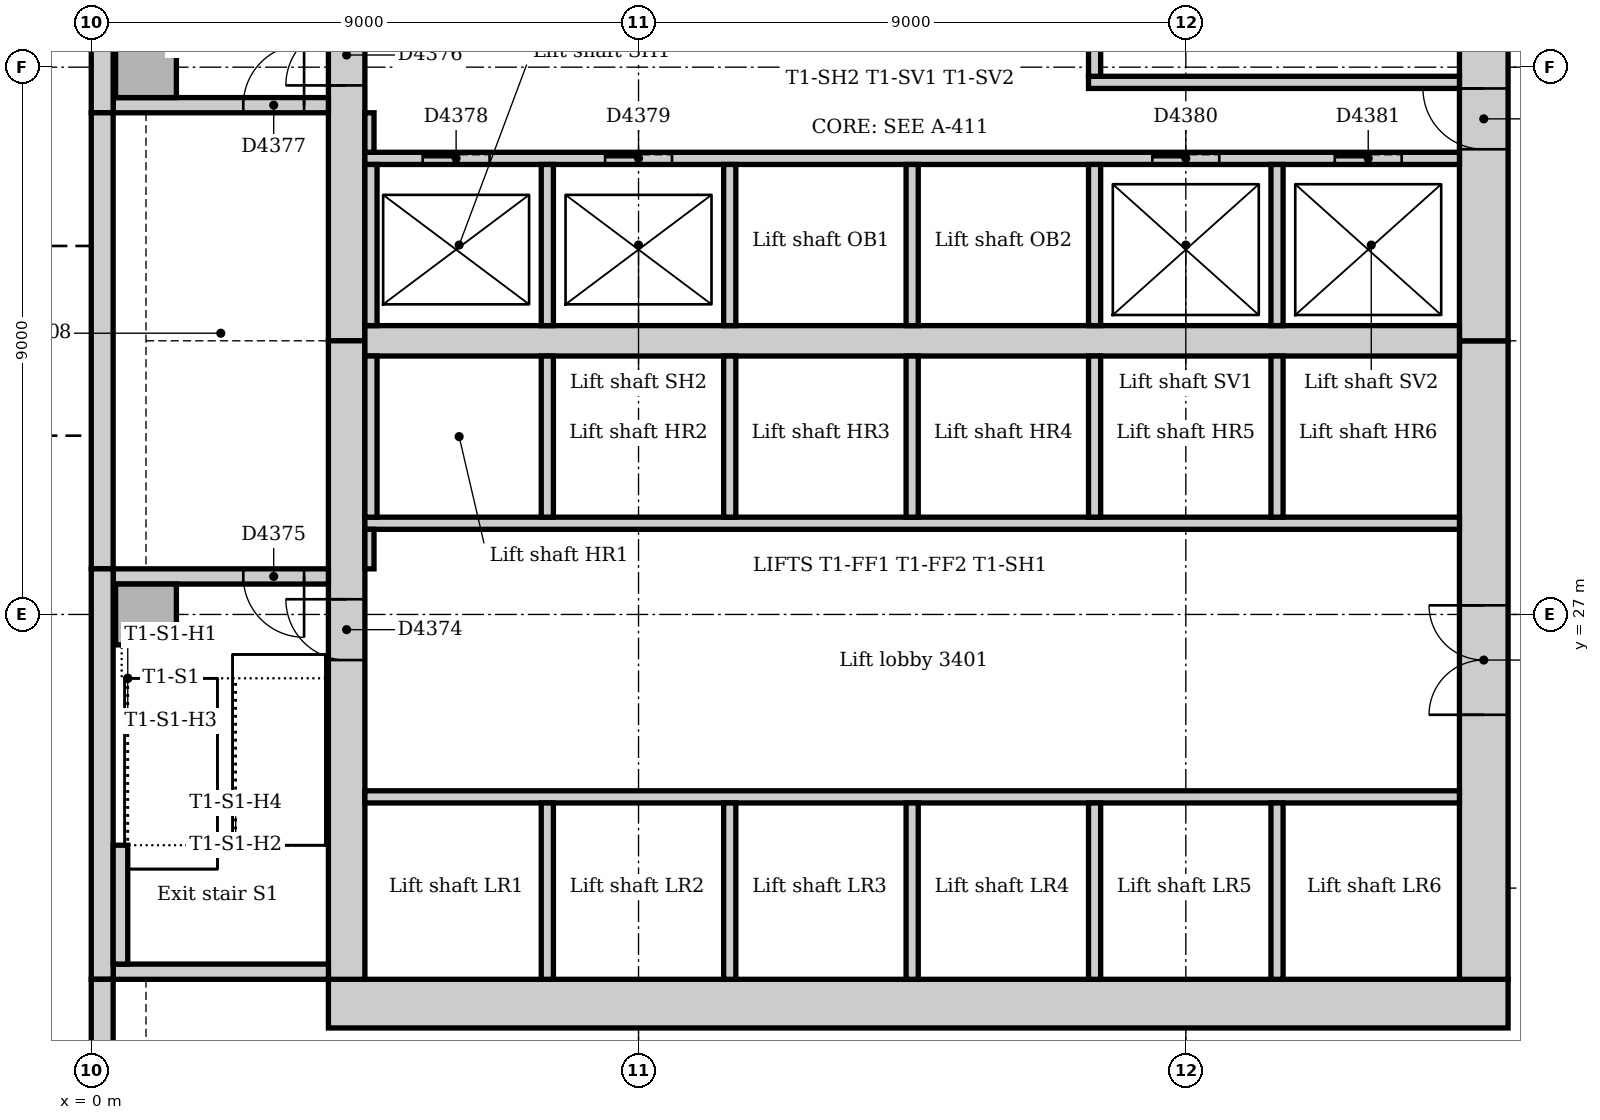
"""IFC4 building model, lengths in metres.
Left out: names, types, materials, properties, quantities, classifications, styles, units other than length and angle.
Written with IfcOpenShell. Run it as: python <this file> out.ifc"""

import sys

from ifc_helpers import new_model, si_unit, direction, frame, frame_2d, origin, origin_2d, place, context, subcontext, project, spatial, rectangle, extrude, element, fill, save


model = new_model("IFC4")
c1 = context("Model", 3, precision=1e-05, world=origin(), true_north=direction((0.0, 1.0)))
c2 = subcontext(c1, "Body", "Model", "MODEL_VIEW")
j1 = project(units=[si_unit("LENGTHUNIT", "METRE"), si_unit("PLANEANGLEUNIT", "RADIAN")], contexts=[c1])
p1 = place(None, origin())
s1 = spatial("IfcSite", under=j1, at=p1, CompositionType="ELEMENT")
p2 = place(p1, origin())
s2 = spatial("IfcBuilding", under=s1, at=p2, CompositionType="ELEMENT")
p3 = place(p2, frame((0.0, 0.0, 144.0)))
s3 = spatial("IfcBuildingStorey", under=s2, at=p3, CompositionType="ELEMENT", Elevation=144.0)
p4 = place(p3, frame((3.9, 20.6, 0.0), z_axis=(0.0, 0.0, 1.0), x_axis=(1.0, 0.0, 0.0)))
e1 = element("IfcWall", 1, at=p4, inside=s3, PredefinedType="SOLIDWALL", context=c2, shape_type="SweptSolid", body=[
    extrude(rectangle(XDim=19.4, YDim=0.8, at=frame_2d((9.7, 0.0))), origin(), (0.0, 0.0, 1.0), 5.0),
])
p5 = place(p3, frame((22.9, 21.0, 0.0), z_axis=(0.0, 0.0, 1.0), x_axis=(0.0, 1.0, 0.0)))
e2 = element("IfcWall", 2, at=p5, inside=s3, PredefinedType="SOLIDWALL", context=c2, shape_type="SweptSolid", body=[
    extrude(rectangle(XDim=10.5, YDim=0.8, at=frame_2d((5.25, 0.0))), origin(), (0.0, 0.0, 1.0), 5.0),
])
p6 = place(p5, frame((4.35, 0.0, 0.0)))
e3 = element("IfcOpeningElement", 3, at=p6, cuts=e2, PredefinedType="OPENING", context=c2, shape_type="SweptSolid", body=[
    extrude(rectangle(XDim=1.8, YDim=2.1, at=frame_2d((0.9, 1.05))), frame((0.0, 0.41, 0.0), z_axis=(0.0, -1.0, 0.0), x_axis=(1.0, 0.0, 0.0)), (0.0, 0.0, 1.0), 0.82),
])
p7 = place(p3, frame((22.9, 31.5, 0.0), z_axis=(0.0, 0.0, 1.0), x_axis=(0.0, 1.0, 0.0)))
e4 = element("IfcWall", 4, at=p7, inside=s3, PredefinedType="SOLIDWALL", context=c2, shape_type="SweptSolid", body=[
    extrude(rectangle(XDim=10.5, YDim=0.8, at=frame_2d((5.25, 0.0))), origin(), (0.0, 0.0, 1.0), 5.0),
])
p8 = place(p7, frame((3.15, 0.0, 0.0)))
e5 = element("IfcOpeningElement", 5, at=p8, cuts=e4, PredefinedType="OPENING", context=c2, shape_type="SweptSolid", body=[
    extrude(rectangle(XDim=1.0, YDim=2.1, at=frame_2d((0.5, 1.05))), frame((0.0, 0.41, 0.0), z_axis=(0.0, -1.0, 0.0), x_axis=(1.0, 0.0, 0.0)), (0.0, 0.0, 1.0), 0.82),
])
p9 = place(p7, frame((5.2, 0.0, 0.0)))
e6 = element("IfcOpeningElement", 6, at=p9, cuts=e4, PredefinedType="OPENING", context=c2, shape_type="SweptSolid", body=[
    extrude(rectangle(XDim=1.0, YDim=2.1, at=frame_2d((0.5, 1.05))), frame((0.0, 0.41, 0.0), z_axis=(0.0, -1.0, 0.0), x_axis=(1.0, 0.0, 0.0)), (0.0, 0.0, 1.0), 0.82),
])
p10 = place(p3, frame((4.2, 42.0, 0.0), z_axis=(0.0, 0.0, 1.0), x_axis=(0.0, -1.0, 0.0)))
e7 = element("IfcWall", 7, at=p10, inside=s3, PredefinedType="SOLIDWALL", context=c2, shape_type="SweptSolid", body=[
    extrude(rectangle(XDim=10.5, YDim=0.6, at=frame_2d((5.25, 0.0))), origin(), (0.0, 0.0, 1.0), 5.0),
])
p11 = place(p10, frame((5.3, 0.0, 0.0)))
e8 = element("IfcOpeningElement", 8, at=p11, cuts=e7, PredefinedType="OPENING", context=c2, shape_type="SweptSolid", body=[
    extrude(rectangle(XDim=1.0, YDim=2.1, at=frame_2d((0.5, 1.05))), frame((0.0, 0.31, 0.0), z_axis=(0.0, -1.0, 0.0), x_axis=(1.0, 0.0, 0.0)), (0.0, 0.0, 1.0), 0.62),
])
p12 = place(p3, frame((4.2, 31.5, 0.0), z_axis=(0.0, 0.0, 1.0), x_axis=(0.0, -1.0, 0.0)))
e9 = element("IfcWall", 9, at=p12, inside=s3, PredefinedType="SOLIDWALL", context=c2, shape_type="SweptSolid", body=[
    extrude(rectangle(XDim=10.5, YDim=0.6, at=frame_2d((5.25, 0.0))), origin(), (0.0, 0.0, 1.0), 5.0),
])
p13 = place(p12, frame((4.25, 0.0, 0.0)))
e10 = element("IfcOpeningElement", 10, at=p13, cuts=e9, PredefinedType="OPENING", context=c2, shape_type="SweptSolid", body=[
    extrude(rectangle(XDim=1.0, YDim=2.1, at=frame_2d((0.5, 1.05))), frame((0.0, 0.31, 0.0), z_axis=(0.0, -1.0, 0.0), x_axis=(1.0, 0.0, 0.0)), (0.0, 0.0, 1.0), 0.62),
])
p14 = place(p3, frame((4.5, 31.5, 0.0), z_axis=(0.0, 0.0, 1.0), x_axis=(1.0, 0.0, 0.0)))
e11 = element("IfcWall", 11, at=p14, inside=s3, PredefinedType="SOLIDWALL", context=c2, shape_type="SweptSolid", body=[
    extrude(rectangle(XDim=18.0, YDim=0.5, at=frame_2d((9.0, 0.0))), origin(), (0.0, 0.0, 1.0), 5.0),
])
p15 = place(p3, frame((0.36, 21.125, 0.0), z_axis=(0.0, 0.0, 1.0), x_axis=(1.0, 0.0, 0.0)))
e12 = element("IfcWall", 12, at=p15, inside=s3, PredefinedType="SOLIDWALL", context=c2, shape_type="SweptSolid", body=[
    extrude(rectangle(XDim=3.54, YDim=0.25, at=frame_2d((1.77, 0.0))), origin(), (0.0, 0.0, 1.0), 5.0),
])
p16 = place(p3, frame((3.9, 27.625, 0.0), z_axis=(0.0, 0.0, 1.0), x_axis=(-1.0, 0.0, 0.0)))
e13 = element("IfcWall", 13, at=p16, inside=s3, PredefinedType="SOLIDWALL", context=c2, shape_type="SweptSolid", body=[
    extrude(rectangle(XDim=3.54, YDim=0.25, at=frame_2d((1.77, 0.0))), origin(), (0.0, 0.0, 1.0), 5.0),
])
p17 = place(p16, frame((0.4, 0.0, 0.0)))
e14 = element("IfcOpeningElement", 14, at=p17, cuts=e13, PredefinedType="OPENING", context=c2, shape_type="SweptSolid", body=[
    extrude(rectangle(XDim=1.0, YDim=2.1, at=frame_2d((0.5, 1.05))), frame((0.0, 0.135, 0.0), z_axis=(0.0, -1.0, 0.0), x_axis=(1.0, 0.0, 0.0)), (0.0, 0.0, 1.0), 0.27),
])
p18 = place(p3, frame((0.36, 35.375, 0.0), z_axis=(0.0, 0.0, 1.0), x_axis=(1.0, 0.0, 0.0)))
e15 = element("IfcWall", 15, at=p18, inside=s3, PredefinedType="SOLIDWALL", context=c2, shape_type="SweptSolid", body=[
    extrude(rectangle(XDim=3.54, YDim=0.25, at=frame_2d((1.77, 0.0))), origin(), (0.0, 0.0, 1.0), 5.0),
])
p19 = place(p18, frame((2.14, 0.0, 0.0)))
e16 = element("IfcOpeningElement", 16, at=p19, cuts=e15, PredefinedType="OPENING", context=c2, shape_type="SweptSolid", body=[
    extrude(rectangle(XDim=1.0, YDim=2.1, at=frame_2d((0.5, 1.05))), frame((0.0, 0.135, 0.0), z_axis=(0.0, -1.0, 0.0), x_axis=(1.0, 0.0, 0.0)), (0.0, 0.0, 1.0), 0.27),
])
for number, where, z_axis, x_axis in (
    (17, (0.9, 27.0, 0.0), (0.0, 0.0, 1.0), (1.0, 0.0, 0.0)),
    (18, (0.9, 36.0, 0.0), (0.0, 0.0, 1.0), (1.0, 0.0, 0.0)),
):
    element("IfcColumn", number, at=place(p3, frame(where, z_axis=z_axis, x_axis=x_axis)), inside=s3, PredefinedType="COLUMN", context=c2, shape_type="SweptSolid", body=[
        extrude(rectangle(XDim=1.0, YDim=1.0, at=origin_2d()), origin(), (0.0, 0.0, 1.0), 5.0),
    ])
p20 = place(p3, frame((0.18, 42.0, 0.0), z_axis=(0.0, 0.0, 1.0), x_axis=(0.0, -1.0, 0.0)))
e19 = element("IfcWall", 19, at=p20, inside=s3, PredefinedType="STANDARD", context=c2, shape_type="SweptSolid", body=[
    extrude(rectangle(XDim=6.75, YDim=0.36, at=frame_2d((3.375, 0.0))), origin(), (0.0, 0.0, 1.0), 4.85),
])
p21 = place(p3, frame((0.18, 35.25, 0.0), z_axis=(0.0, 0.0, 1.0), x_axis=(0.0, -1.0, 0.0)))
e20 = element("IfcWall", 20, at=p21, inside=s3, PredefinedType="STANDARD", context=c2, shape_type="SweptSolid", body=[
    extrude(rectangle(XDim=7.5, YDim=0.36, at=frame_2d((3.75, 0.0))), origin(), (0.0, 0.0, 1.0), 4.85),
])
p22 = place(p3, frame((0.18, 27.75, 0.0), z_axis=(0.0, 0.0, 1.0), x_axis=(0.0, -1.0, 0.0)))
e21 = element("IfcWall", 21, at=p22, inside=s3, PredefinedType="STANDARD", context=c2, shape_type="SweptSolid", body=[
    extrude(rectangle(XDim=6.75, YDim=0.36, at=frame_2d((3.375, 0.0))), origin(), (0.0, 0.0, 1.0), 4.85),
])
p23 = place(p3, frame((0.18, 21.0, 0.0), z_axis=(0.0, 0.0, 1.0), x_axis=(0.0, -1.0, 0.0)))
e22 = element("IfcWall", 22, at=p23, inside=s3, PredefinedType="STANDARD", context=c2, shape_type="SweptSolid", body=[
    extrude(rectangle(XDim=12.257, YDim=0.36, at=frame_2d((6.129, 0.0))), origin(), (0.0, 0.0, 1.0), 4.85),
])
p24 = place(p23, frame((1.35, 0.0, 0.9)))
e23 = element("IfcOpeningElement", 23, at=p24, cuts=e22, PredefinedType="OPENING", context=c2, shape_type="SweptSolid", body=[
    extrude(rectangle(XDim=3.3, YDim=2.2, at=frame_2d((1.65, 1.1))), frame((0.0, 0.19, 0.0), z_axis=(0.0, -1.0, 0.0), x_axis=(1.0, 0.0, 0.0)), (0.0, 0.0, 1.0), 0.38),
])
p25 = place(p23, frame((5.85, 0.0, 0.9)))
e24 = element("IfcOpeningElement", 24, at=p25, cuts=e22, PredefinedType="OPENING", context=c2, shape_type="SweptSolid", body=[
    extrude(rectangle(XDim=3.3, YDim=2.2, at=frame_2d((1.65, 1.1))), frame((0.0, 0.19, 0.0), z_axis=(0.0, -1.0, 0.0), x_axis=(1.0, 0.0, 0.0)), (0.0, 0.0, 1.0), 0.38),
])
p26 = place(p3, frame((0.48, 21.25, 0.0), z_axis=(0.0, 0.0, 1.0), x_axis=(0.0, 1.0, 0.0)))
e25 = element("IfcWall", 25, at=p26, inside=s3, PredefinedType="STANDARD", context=c2, shape_type="SweptSolid", body=[
    extrude(rectangle(XDim=1.955, YDim=0.24, at=frame_2d((0.978, 0.0))), origin(), (0.0, 0.0, 1.0), 5.0),
])
p27 = place(p3, frame((16.4, 35.75, 0.0), z_axis=(0.0, 0.0, 1.0), x_axis=(1.0, 0.0, 0.0)))
e26 = element("IfcWall", 26, at=p27, inside=s3, PredefinedType="PARTITIONING", context=c2, shape_type="SweptSolid", body=[
    extrude(rectangle(XDim=6.1, YDim=0.2, at=frame_2d((3.05, 0.0))), origin(), (0.0, 0.0, 1.0), 4.85),
])
p28 = place(p3, frame((16.5, 35.85, 0.0), z_axis=(0.0, 0.0, 1.0), x_axis=(0.0, 1.0, 0.0)))
e27 = element("IfcWall", 27, at=p28, inside=s3, PredefinedType="PARTITIONING", context=c2, shape_type="SweptSolid", body=[
    extrude(rectangle(XDim=2.55, YDim=0.2, at=frame_2d((1.275, 0.0))), origin(), (0.0, 0.0, 1.0), 4.85),
])
for number, where, z_axis, x_axis in (
    (28, (4.5, 24.0, 0.0), (0.0, 0.0, 1.0), (1.0, 0.0, 0.0)),
    (29, (4.5, 28.5, 0.0), (0.0, 0.0, 1.0), (1.0, 0.0, 0.0)),
):
    element("IfcWall", number, at=place(p3, frame(where, z_axis=z_axis, x_axis=x_axis)), inside=s3, PredefinedType="PARTITIONING", context=c2, shape_type="SweptSolid", body=[
        extrude(rectangle(XDim=18.0, YDim=0.2, at=frame_2d((9.0, 0.0))), origin(), (0.0, 0.0, 1.0), 4.85),
    ])
p29 = place(p3, frame((4.5, 34.5, 0.0), z_axis=(0.0, 0.0, 1.0), x_axis=(1.0, 0.0, 0.0)))
e30 = element("IfcWall", 30, at=p29, inside=s3, PredefinedType="PARTITIONING", context=c2, shape_type="SweptSolid", body=[
    extrude(rectangle(XDim=18.0, YDim=0.2, at=frame_2d((9.0, 0.0))), origin(), (0.0, 0.0, 1.0), 4.85),
])
p30 = place(p29, frame((0.95, 0.0, 0.0)))
e31 = element("IfcOpeningElement", 31, at=p30, cuts=e30, PredefinedType="OPENING", context=c2, shape_type="SweptSolid", body=[
    extrude(rectangle(XDim=1.1, YDim=2.1, at=frame_2d((0.55, 1.05))), frame((0.0, 0.11, 0.0), z_axis=(0.0, -1.0, 0.0), x_axis=(1.0, 0.0, 0.0)), (0.0, 0.0, 1.0), 0.22),
])
p31 = place(p29, frame((3.95, 0.0, 0.0)))
e32 = element("IfcOpeningElement", 32, at=p31, cuts=e30, PredefinedType="OPENING", context=c2, shape_type="SweptSolid", body=[
    extrude(rectangle(XDim=1.1, YDim=2.1, at=frame_2d((0.55, 1.05))), frame((0.0, 0.11, 0.0), z_axis=(0.0, -1.0, 0.0), x_axis=(1.0, 0.0, 0.0)), (0.0, 0.0, 1.0), 0.22),
])
p32 = place(p29, frame((12.95, 0.0, 0.0)))
e33 = element("IfcOpeningElement", 33, at=p32, cuts=e30, PredefinedType="OPENING", context=c2, shape_type="SweptSolid", body=[
    extrude(rectangle(XDim=1.1, YDim=2.1, at=frame_2d((0.55, 1.05))), frame((0.0, 0.11, 0.0), z_axis=(0.0, -1.0, 0.0), x_axis=(1.0, 0.0, 0.0)), (0.0, 0.0, 1.0), 0.22),
])
p33 = place(p29, frame((15.95, 0.0, 0.0)))
e34 = element("IfcOpeningElement", 34, at=p33, cuts=e30, PredefinedType="OPENING", context=c2, shape_type="SweptSolid", body=[
    extrude(rectangle(XDim=1.1, YDim=2.1, at=frame_2d((0.55, 1.05))), frame((0.0, 0.11, 0.0), z_axis=(0.0, -1.0, 0.0), x_axis=(1.0, 0.0, 0.0)), (0.0, 0.0, 1.0), 0.22),
])
for number, where, z_axis, x_axis in (
    (35, (4.6, 31.75, 0.0), (0.0, 0.0, 1.0), (0.0, 1.0, 0.0)),
    (36, (4.6, 28.6, 0.0), (0.0, 0.0, 1.0), (0.0, 1.0, 0.0)),
    (37, (7.5, 28.6, 0.0), (0.0, 0.0, 1.0), (0.0, 1.0, 0.0)),
    (38, (7.5, 31.75, 0.0), (0.0, 0.0, 1.0), (0.0, 1.0, 0.0)),
    (39, (10.5, 28.6, 0.0), (0.0, 0.0, 1.0), (0.0, 1.0, 0.0)),
    (40, (10.5, 31.75, 0.0), (0.0, 0.0, 1.0), (0.0, 1.0, 0.0)),
    (41, (13.5, 28.6, 0.0), (0.0, 0.0, 1.0), (0.0, 1.0, 0.0)),
    (42, (13.5, 31.75, 0.0), (0.0, 0.0, 1.0), (0.0, 1.0, 0.0)),
    (43, (16.5, 28.6, 0.0), (0.0, 0.0, 1.0), (0.0, 1.0, 0.0)),
    (44, (16.5, 31.75, 0.0), (0.0, 0.0, 1.0), (0.0, 1.0, 0.0)),
    (45, (19.5, 28.6, 0.0), (0.0, 0.0, 1.0), (0.0, 1.0, 0.0)),
    (46, (19.5, 31.75, 0.0), (0.0, 0.0, 1.0), (0.0, 1.0, 0.0)),
):
    element("IfcWall", number, at=place(p3, frame(where, z_axis=z_axis, x_axis=x_axis)), inside=s3, PredefinedType="PARTITIONING", context=c2, shape_type="SweptSolid", body=[
        extrude(rectangle(XDim=2.65, YDim=0.2, at=frame_2d((1.325, 0.0))), origin(), (0.0, 0.0, 1.0), 4.85),
    ])
for number, where, z_axis, x_axis in (
    (47, (7.5, 21.0, 0.0), (0.0, 0.0, 1.0), (0.0, 1.0, 0.0)),
    (48, (10.5, 21.0, 0.0), (0.0, 0.0, 1.0), (0.0, 1.0, 0.0)),
    (49, (13.5, 21.0, 0.0), (0.0, 0.0, 1.0), (0.0, 1.0, 0.0)),
    (50, (16.5, 21.0, 0.0), (0.0, 0.0, 1.0), (0.0, 1.0, 0.0)),
    (51, (19.5, 21.0, 0.0), (0.0, 0.0, 1.0), (0.0, 1.0, 0.0)),
):
    element("IfcWall", number, at=place(p3, frame(where, z_axis=z_axis, x_axis=x_axis)), inside=s3, PredefinedType="PARTITIONING", context=c2, shape_type="SweptSolid", body=[
        extrude(rectangle(XDim=2.9, YDim=0.2, at=frame_2d((1.45, 0.0))), origin(), (0.0, 0.0, 1.0), 4.85),
    ])
for number, where, z_axis, x_axis in (
    (52, (4.575, 27.75, 0.0), (0.0, 0.0, 1.0), (0.0, 1.0, 0.0)),
    (53, (4.575, 34.6, 0.0), (0.0, 0.0, 1.0), (0.0, 1.0, 0.0)),
):
    element("IfcWall", number, at=place(p3, frame(where, z_axis=z_axis, x_axis=x_axis)), inside=s3, PredefinedType="PARTITIONING", context=c2, shape_type="SweptSolid", body=[
        extrude(rectangle(XDim=0.65, YDim=0.15, at=frame_2d((0.325, 0.0))), origin(), (0.0, 0.0, 1.0), 4.85),
    ])
p34 = place(p13, frame((1.0, 0.0, 0.0), z_axis=(0.0, 0.0, 1.0), x_axis=(-1.0, 0.0, 0.0)))
e54 = element("IfcDoor", 54, at=p34, inside=s3, OperationType="SINGLE_SWING_RIGHT", PredefinedType="DOOR", context=c2, shape_type="SweptSolid", body=[
    extrude(rectangle(XDim=1.0, YDim=2.1, at=frame_2d((0.5, 1.05))), frame((0.0, 0.025, 0.0), z_axis=(0.0, -1.0, 0.0), x_axis=(1.0, 0.0, 0.0)), (0.0, 0.0, 1.0), 0.05),
])
fill(e10, e54)
p35 = place(p17, origin())
e55 = element("IfcDoor", 55, at=p35, inside=s3, OperationType="SINGLE_SWING_LEFT", PredefinedType="DOOR", context=c2, shape_type="SweptSolid", body=[
    extrude(rectangle(XDim=1.0, YDim=2.1, at=frame_2d((0.5, 1.05))), frame((0.0, 0.025, 0.0), z_axis=(0.0, -1.0, 0.0), x_axis=(1.0, 0.0, 0.0)), (0.0, 0.0, 1.0), 0.05),
])
fill(e14, e55)
p36 = place(p11, frame((1.0, 0.0, 0.0), z_axis=(0.0, 0.0, 1.0), x_axis=(-1.0, 0.0, 0.0)))
e56 = element("IfcDoor", 56, at=p36, inside=s3, OperationType="SINGLE_SWING_LEFT", PredefinedType="DOOR", context=c2, shape_type="SweptSolid", body=[
    extrude(rectangle(XDim=1.0, YDim=2.1, at=frame_2d((0.5, 1.05))), frame((0.0, 0.025, 0.0), z_axis=(0.0, -1.0, 0.0), x_axis=(1.0, 0.0, 0.0)), (0.0, 0.0, 1.0), 0.05),
])
fill(e8, e56)
p37 = place(p19, origin())
e57 = element("IfcDoor", 57, at=p37, inside=s3, OperationType="SINGLE_SWING_RIGHT", PredefinedType="DOOR", context=c2, shape_type="SweptSolid", body=[
    extrude(rectangle(XDim=1.0, YDim=2.1, at=frame_2d((0.5, 1.05))), frame((0.0, 0.025, 0.0), z_axis=(0.0, -1.0, 0.0), x_axis=(1.0, 0.0, 0.0)), (0.0, 0.0, 1.0), 0.05),
])
fill(e16, e57)
p38 = place(p30, origin())
e58 = element("IfcDoor", 58, at=p38, inside=s3, OperationType="SLIDING_TO_LEFT", PredefinedType="DOOR", context=c2, shape_type="SweptSolid", body=[
    extrude(rectangle(XDim=1.1, YDim=2.1, at=frame_2d((0.55, 1.05))), frame((0.0, 0.025, 0.0), z_axis=(0.0, -1.0, 0.0), x_axis=(1.0, 0.0, 0.0)), (0.0, 0.0, 1.0), 0.05),
])
fill(e31, e58)
p39 = place(p31, origin())
e59 = element("IfcDoor", 59, at=p39, inside=s3, OperationType="SLIDING_TO_LEFT", PredefinedType="DOOR", context=c2, shape_type="SweptSolid", body=[
    extrude(rectangle(XDim=1.1, YDim=2.1, at=frame_2d((0.55, 1.05))), frame((0.0, 0.025, 0.0), z_axis=(0.0, -1.0, 0.0), x_axis=(1.0, 0.0, 0.0)), (0.0, 0.0, 1.0), 0.05),
])
fill(e32, e59)
p40 = place(p32, origin())
e60 = element("IfcDoor", 60, at=p40, inside=s3, OperationType="SLIDING_TO_LEFT", PredefinedType="DOOR", context=c2, shape_type="SweptSolid", body=[
    extrude(rectangle(XDim=1.1, YDim=2.1, at=frame_2d((0.55, 1.05))), frame((0.0, 0.025, 0.0), z_axis=(0.0, -1.0, 0.0), x_axis=(1.0, 0.0, 0.0)), (0.0, 0.0, 1.0), 0.05),
])
fill(e33, e60)
p41 = place(p33, origin())
e61 = element("IfcDoor", 61, at=p41, inside=s3, OperationType="SLIDING_TO_LEFT", PredefinedType="DOOR", context=c2, shape_type="SweptSolid", body=[
    extrude(rectangle(XDim=1.1, YDim=2.1, at=frame_2d((0.55, 1.05))), frame((0.0, 0.025, 0.0), z_axis=(0.0, -1.0, 0.0), x_axis=(1.0, 0.0, 0.0)), (0.0, 0.0, 1.0), 0.05),
])
fill(e34, e61)
p42 = place(p6, origin())
e62 = element("IfcDoor", 62, at=p42, inside=s3, OperationType="DOUBLE_DOOR_DOUBLE_SWING", PredefinedType="DOOR", context=c2, shape_type="SweptSolid", body=[
    extrude(rectangle(XDim=1.8, YDim=2.1, at=frame_2d((0.9, 1.05))), frame((0.0, 0.025, 0.0), z_axis=(0.0, -1.0, 0.0), x_axis=(1.0, 0.0, 0.0)), (0.0, 0.0, 1.0), 0.05),
])
fill(e3, e62)
p43 = place(p8, origin())
e63 = element("IfcDoor", 63, at=p43, inside=s3, OperationType="SINGLE_SWING_RIGHT", PredefinedType="DOOR", context=c2, shape_type="SweptSolid", body=[
    extrude(rectangle(XDim=1.0, YDim=2.1, at=frame_2d((0.5, 1.05))), frame((0.0, 0.025, 0.0), z_axis=(0.0, -1.0, 0.0), x_axis=(1.0, 0.0, 0.0)), (0.0, 0.0, 1.0), 0.05),
])
fill(e5, e63)
save(model, sys.argv[1])
